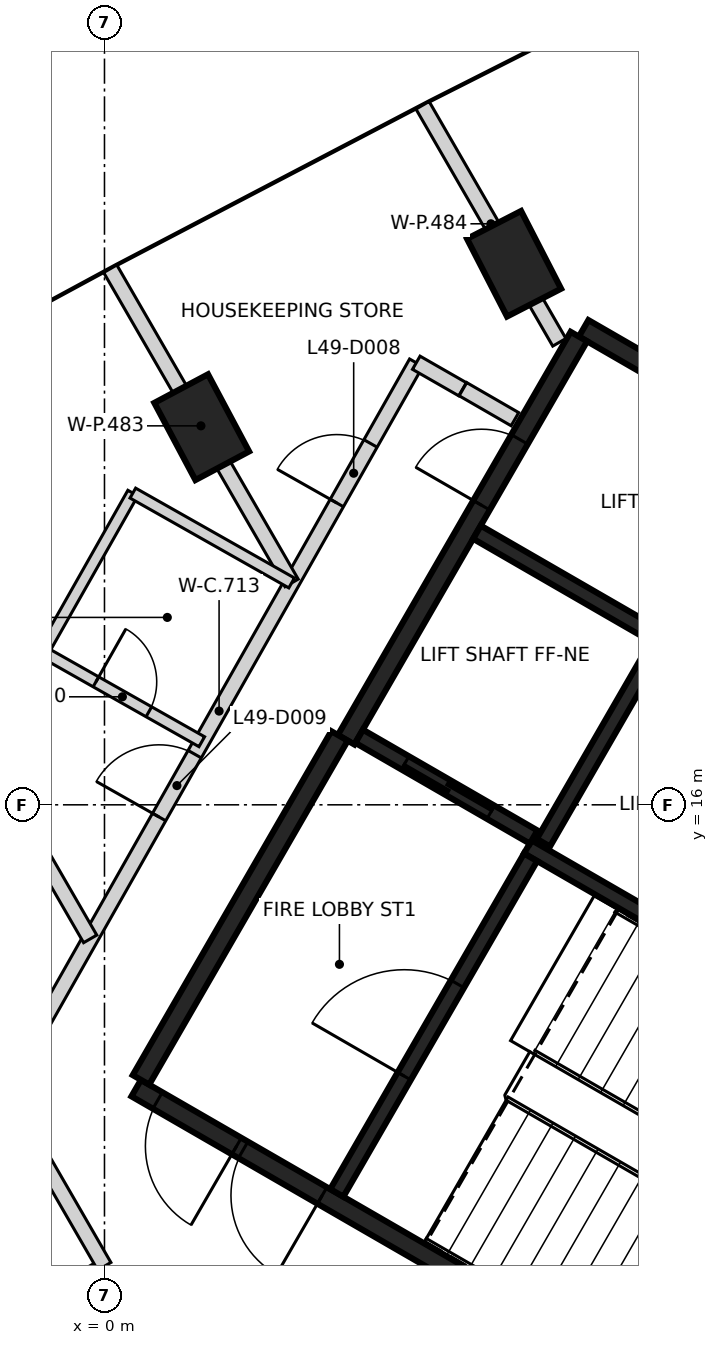
"""IFC4 building model, lengths in metres.
Left out: names, types, materials, properties, quantities, classifications, styles, units other than length and angle.
Written with IfcOpenShell. Run it as: python <this file> out.ifc"""

import sys

from ifc_helpers import new_model, si_unit, direction, frame, frame_2d, origin, origin_2d, place, context, subcontext, project, spatial, rectangle, extrude, element, fill, save


model = new_model("IFC4")
c1 = context("Model", 3, precision=1e-05, world=origin(), true_north=direction((0.0, 1.0)))
c2 = subcontext(c1, "Body", "Model", "MODEL_VIEW")
j1 = project(units=[si_unit("LENGTHUNIT", "METRE"), si_unit("PLANEANGLEUNIT", "RADIAN")], contexts=[c1])
p1 = place(None, origin())
s1 = spatial("IfcSite", under=j1, at=p1, CompositionType="ELEMENT")
p2 = place(p1, origin())
s2 = spatial("IfcBuilding", under=s1, at=p2, CompositionType="ELEMENT")
p3 = place(p2, frame((0.0, 0.0, 197.2)))
s3 = spatial("IfcBuildingStorey", under=s2, at=p3, CompositionType="ELEMENT", Elevation=197.2)
for number, where, z_axis, x_axis in (
    (1, (5.388, 23.118, -0.35), (0.0, 0.0, 1.0), (-0.458, 0.889, 0.0)),
    (2, (1.279, 20.968, -0.35), (0.0, 0.0, 1.0), (-0.47, 0.883, 0.0)),
):
    element("IfcColumn", number, at=place(p3, frame(where, z_axis=z_axis, x_axis=x_axis)), inside=s3, PredefinedType="COLUMN", context=c2, shape_type="SweptSolid", body=[
        extrude(rectangle(XDim=1.15, YDim=0.8, at=origin_2d()), origin(), (0.0, 0.0, 1.0), 3.6),
    ])
p4 = place(p3, frame((10.42, 6.498, 0.0), z_axis=(0.0, 0.0, 1.0), x_axis=(-0.866021906294, 0.500006057782, 0.0)))
e3 = element("IfcWall", 3, at=p4, inside=s3, PredefinedType="SHEAR", context=c2, shape_type="SweptSolid", body=[
    extrude(rectangle(XDim=11.55, YDim=0.25, at=frame_2d((5.775, 0.0))), origin(), (0.0, 0.0, 1.0), 3.25),
])
p5 = place(p4, frame((10.025, 0.0, 0.0)))
e4 = element("IfcOpeningElement", 4, at=p5, cuts=e3, PredefinedType="OPENING", context=c2, shape_type="SweptSolid", body=[
    extrude(rectangle(XDim=1.2, YDim=2.1, at=frame_2d((0.6, 1.05))), frame((0.0, 0.135, 0.0), z_axis=(0.0, -1.0, 0.0), x_axis=(1.0, 0.0, 0.0)), (0.0, 0.0, 1.0), 0.27),
])
p6 = place(p4, frame((8.725, 0.0, 0.0)))
e5 = element("IfcOpeningElement", 5, at=p6, cuts=e3, PredefinedType="OPENING", context=c2, shape_type="SweptSolid", body=[
    extrude(rectangle(XDim=1.2, YDim=2.1, at=frame_2d((0.6, 1.05))), frame((0.0, 0.135, 0.0), z_axis=(0.0, -1.0, 0.0), x_axis=(1.0, 0.0, 0.0)), (0.0, 0.0, 1.0), 0.27),
])
p7 = place(p3, frame((6.304, 22.269, 0.0), z_axis=(0.0, 0.0, 1.0), x_axis=(0.866022959057, -0.500004234368, 0.0)))
e6 = element("IfcWall", 6, at=p7, inside=s3, PredefinedType="SHEAR", context=c2, shape_type="SweptSolid", body=[
    extrude(rectangle(XDim=8.75, YDim=0.25, at=frame_2d((4.375, 0.0))), origin(), (0.0, 0.0, 1.0), 3.25),
])
p8 = place(p3, frame((3.179, 16.856, 0.0), z_axis=(0.0, 0.0, 1.0), x_axis=(0.500001955336, 0.866024274868, 0.0)))
e7 = element("IfcWall", 7, at=p8, inside=s3, PredefinedType="SHEAR", context=c2, shape_type="SweptSolid", body=[
    extrude(rectangle(XDim=6.125, YDim=0.25, at=frame_2d((3.062, 0.0))), origin(), (0.0, 0.0, 1.0), 3.25),
])
p9 = place(p8, frame((3.563, 0.0, 0.0)))
e8 = element("IfcOpeningElement", 8, at=p9, cuts=e7, PredefinedType="OPENING", context=c2, shape_type="SweptSolid", body=[
    extrude(rectangle(XDim=1.0, YDim=2.1, at=frame_2d((0.5, 1.05))), frame((0.0, 0.135, 0.0), z_axis=(0.0, -1.0, 0.0), x_axis=(1.0, 0.0, 0.0)), (0.0, 0.0, 1.0), 0.27),
])
p10 = place(p3, frame((0.48, 12.381, 0.0), z_axis=(0.0, 0.0, 1.0), x_axis=(0.49999885962, 0.866026062182, 0.0)))
e9 = element("IfcWall", 9, at=p10, inside=s3, PredefinedType="SHEAR", context=c2, shape_type="SweptSolid", body=[
    extrude(rectangle(XDim=5.225, YDim=0.25, at=frame_2d((2.612, 0.0))), origin(), (0.0, 0.0, 1.0), 3.25),
])
p11 = place(p3, frame((10.743, 12.46, 0.0), z_axis=(0.0, 0.0, 1.0), x_axis=(-0.866018848283, 0.500011354289, 0.0)))
e10 = element("IfcWall", 10, at=p11, inside=s3, PredefinedType="SHEAR", context=c2, shape_type="SweptSolid", body=[
    extrude(rectangle(XDim=5.974, YDim=0.2, at=frame_2d((2.987, 0.0))), origin(), (0.0, 0.0, 1.0), 3.25),
])
p12 = place(p3, frame((3.057, 10.895, 0.0), z_axis=(0.0, 0.0, 1.0), x_axis=(0.500027839223, 0.866009330205, 0.0)))
e11 = element("IfcWall", 11, at=p12, inside=s3, PredefinedType="SHEAR", context=c2, shape_type="SweptSolid", body=[
    extrude(rectangle(XDim=5.098, YDim=0.2, at=frame_2d((2.549, 0.0))), origin(), (0.0, 0.0, 1.0), 3.25),
])
p13 = place(p12, frame((1.774, 0.0, 0.0)))
e12 = element("IfcOpeningElement", 12, at=p13, cuts=e11, PredefinedType="OPENING", context=c2, shape_type="SweptSolid", body=[
    extrude(rectangle(XDim=1.4, YDim=2.1, at=frame_2d((0.7, 1.05))), frame((0.0, 0.11, 0.0), z_axis=(0.0, -1.0, 0.0), x_axis=(1.0, 0.0, 0.0)), (0.0, 0.0, 1.0), 0.22),
])
p14 = place(p3, frame((7.324, 18.187, 0.0), z_axis=(0.0, 0.0, 1.0), x_axis=(-0.499967891604, -0.866043940782, 0.0)))
e13 = element("IfcWall", 13, at=p14, inside=s3, PredefinedType="SHEAR", context=c2, shape_type="SweptSolid", body=[
    extrude(rectangle(XDim=3.1, YDim=0.2, at=frame_2d((1.55, 0.0))), origin(), (0.0, 0.0, 1.0), 3.25),
])
p15 = place(p3, frame((5.646, 15.576, 0.0), z_axis=(0.0, 0.0, 1.0), x_axis=(-0.866018407898, 0.500012117035, 0.0)))
e14 = element("IfcWall", 14, at=p15, inside=s3, PredefinedType="SHEAR", context=c2, shape_type="SweptSolid", body=[
    extrude(rectangle(XDim=2.651, YDim=0.2, at=frame_2d((1.325, 0.0))), origin(), (0.0, 0.0, 1.0), 3.25),
])
p16 = place(p15, frame((0.652, 0.0, 0.0)))
e15 = element("IfcOpeningElement", 15, at=p16, cuts=e14, PredefinedType="OPENING", context=c2, shape_type="SweptSolid", body=[
    extrude(rectangle(XDim=1.3, YDim=2.1, at=frame_2d((0.65, 1.05))), frame((0.0, 0.11, 0.0), z_axis=(0.0, -1.0, 0.0), x_axis=(1.0, 0.0, 0.0)), (0.0, 0.0, 1.0), 0.22),
])
p17 = place(p3, frame((7.196, 18.26, 0.0), z_axis=(0.0, 0.0, 1.0), x_axis=(-0.866018407898, 0.500012117035, 0.0)))
e16 = element("IfcWall", 16, at=p17, inside=s3, PredefinedType="SHEAR", context=c2, shape_type="SweptSolid", body=[
    extrude(rectangle(XDim=2.651, YDim=0.2, at=frame_2d((1.325, 0.0))), origin(), (0.0, 0.0, 1.0), 3.25),
])
p18 = place(p3, frame((-10.334, 3.963, 0.0), z_axis=(0.0, 0.0, 1.0), x_axis=(0.866013159114, 0.500021207791, 0.0)))
e17 = element("IfcWall", 17, at=p18, inside=s3, PredefinedType="PARTITIONING", context=c2, shape_type="SweptSolid", body=[
    extrude(rectangle(XDim=11.931, YDim=0.2, at=frame_2d((5.966, 0.0))), origin(), (0.0, 0.0, 1.0), 3.25),
])
p19 = place(p18, frame((10.103, 0.0, 0.0)))
e18 = element("IfcOpeningElement", 18, at=p19, cuts=e17, PredefinedType="OPENING", context=c2, shape_type="SweptSolid", body=[
    extrude(rectangle(XDim=1.0, YDim=2.1, at=frame_2d((0.5, 1.05))), frame((0.0, 0.11, 0.0), z_axis=(0.0, -1.0, 0.0), x_axis=(1.0, 0.0, 0.0)), (0.0, 0.0, 1.0), 0.22),
])
p20 = place(p18, frame((8.149, 0.0, 0.0)))
e19 = element("IfcOpeningElement", 19, at=p20, cuts=e17, PredefinedType="OPENING", context=c2, shape_type="SweptSolid", body=[
    extrude(rectangle(XDim=0.95, YDim=2.1, at=frame_2d((0.475, 1.05))), frame((0.0, 0.11, 0.0), z_axis=(0.0, -1.0, 0.0), x_axis=(1.0, 0.0, 0.0)), (0.0, 0.0, 1.0), 0.22),
])
p21 = place(p18, frame((1.831, 0.0, 0.0)))
e20 = element("IfcOpeningElement", 20, at=p21, cuts=e17, PredefinedType="OPENING", context=c2, shape_type="SweptSolid", body=[
    extrude(rectangle(XDim=1.0, YDim=2.1, at=frame_2d((0.5, 1.05))), frame((0.0, 0.11, 0.0), z_axis=(0.0, -1.0, 0.0), x_axis=(1.0, 0.0, 0.0)), (0.0, 0.0, 1.0), 0.22),
])
p22 = place(p3, frame((-1.086, 12.65, 0.0), z_axis=(0.0, 0.0, 1.0), x_axis=(0.492507119433, 0.870308415051, 0.0)))
e21 = element("IfcWall", 21, at=p22, inside=s3, PredefinedType="PARTITIONING", context=c2, shape_type="SweptSolid", body=[
    extrude(rectangle(XDim=10.531, YDim=0.2, at=frame_2d((5.266, 0.0))), origin(), (0.0, 0.0, 1.0), 3.25),
])
p23 = place(p22, frame((8.411, 0.0, 0.0)))
e22 = element("IfcOpeningElement", 22, at=p23, cuts=e21, PredefinedType="OPENING", context=c2, shape_type="SweptSolid", body=[
    extrude(rectangle(XDim=0.9, YDim=2.1, at=frame_2d((0.45, 1.05))), frame((0.0, 0.11, 0.0), z_axis=(0.0, -1.0, 0.0), x_axis=(1.0, 0.0, 0.0)), (0.0, 0.0, 1.0), 0.22),
])
p24 = place(p22, frame((3.664, 0.0, 0.0)))
e23 = element("IfcOpeningElement", 23, at=p24, cuts=e21, PredefinedType="OPENING", context=c2, shape_type="SweptSolid", body=[
    extrude(rectangle(XDim=0.95, YDim=2.1, at=frame_2d((0.475, 1.05))), frame((0.0, 0.11, 0.0), z_axis=(0.0, -1.0, 0.0), x_axis=(1.0, 0.0, 0.0)), (0.0, 0.0, 1.0), 0.22),
])
p25 = place(p3, frame((-0.964, 11.595, 0.0), z_axis=(0.0, 0.0, 1.0), x_axis=(0.500110566207, -0.865961558944, 0.0)))
e24 = element("IfcWall", 24, at=p25, inside=s3, PredefinedType="PARTITIONING", context=c2, shape_type="SweptSolid", body=[
    extrude(rectangle(XDim=1.924, YDim=0.2, at=frame_2d((0.962, 0.0))), origin(), (0.0, 0.0, 1.0), 3.25),
])
p26 = place(p3, frame((4.102, 21.816, 0.0), z_axis=(0.0, 0.0, 1.0), x_axis=(0.867664502326, -0.497150189986, 0.0)))
e25 = element("IfcWall", 25, at=p26, inside=s3, PredefinedType="PARTITIONING", context=c2, shape_type="SweptSolid", body=[
    extrude(rectangle(XDim=0.702, YDim=0.2, at=frame_2d((0.351, 0.0))), origin(), (0.0, 0.0, 1.0), 3.25),
])
p27 = place(p3, frame((4.716, 21.468, 0.0), z_axis=(0.0, 0.0, 1.0), x_axis=(0.865912682783, -0.500195187698, 0.0)))
e26 = element("IfcWall", 26, at=p27, inside=s3, PredefinedType="PARTITIONING", context=c2, shape_type="SweptSolid", body=[
    extrude(rectangle(XDim=0.79, YDim=0.2, at=frame_2d((0.395, 0.0))), origin(), (0.0, 0.0, 1.0), 3.25),
])
p28 = place(p3, frame((-4.004, 20.845, 0.0), z_axis=(0.0, 0.0, 1.0), x_axis=(0.500003076341, -0.866023627651, 0.0)))
e27 = element("IfcWall", 27, at=p28, inside=s3, PredefinedType="PARTITIONING", context=c2, shape_type="SweptSolid", body=[
    extrude(rectangle(XDim=7.631, YDim=0.2, at=frame_2d((3.816, 0.0))), origin(), (0.0, 0.0, 1.0), 3.25),
])
p29 = place(p3, frame((0.076, 23.052, 0.0), z_axis=(0.0, 0.0, 1.0), x_axis=(0.499957131376, -0.866050152581, 0.0)))
e28 = element("IfcWall", 28, at=p29, inside=s3, PredefinedType="PARTITIONING", context=c2, shape_type="SweptSolid", body=[
    extrude(rectangle(XDim=4.773, YDim=0.2, at=frame_2d((2.386, 0.0))), origin(), (0.0, 0.0, 1.0), 3.25),
])
p30 = place(p3, frame((4.184, 25.203, 0.0), z_axis=(0.0, 0.0, 1.0), x_axis=(0.4998731114, -0.866098650558, 0.0)))
e29 = element("IfcWall", 29, at=p30, inside=s3, PredefinedType="PARTITIONING", context=c2, shape_type="SweptSolid", body=[
    extrude(rectangle(XDim=3.601, YDim=0.2, at=frame_2d((1.8, 0.0))), origin(), (0.0, 0.0, 1.0), 3.25),
])
p31 = place(p3, frame((-0.809, 18.012, 0.0), z_axis=(0.0, 0.0, 1.0), x_axis=(0.492476131012, 0.870325950655, 0.0)))
e30 = element("IfcWall", 30, at=p31, inside=s3, PredefinedType="PARTITIONING", context=c2, shape_type="SweptSolid", body=[
    extrude(rectangle(XDim=2.4, YDim=0.15, at=frame_2d((1.2, 0.0))), origin(), (0.0, 0.0, 1.0), 3.25),
])
p32 = place(p3, frame((-0.809, 18.012, 0.0), z_axis=(0.0, 0.0, 1.0), x_axis=(0.870369543509, -0.492399083806, 0.0)))
e31 = element("IfcWall", 31, at=p32, inside=s3, PredefinedType="PARTITIONING", context=c2, shape_type="SweptSolid", body=[
    extrude(rectangle(XDim=2.4, YDim=0.15, at=frame_2d((1.2, 0.0))), origin(), (0.0, 0.0, 1.0), 3.25),
])
p33 = place(p32, frame((0.8, 0.0, 0.0)))
e32 = element("IfcOpeningElement", 32, at=p33, cuts=e31, PredefinedType="OPENING", context=c2, shape_type="SweptSolid", body=[
    extrude(rectangle(XDim=0.8, YDim=2.1, at=frame_2d((0.4, 1.05))), frame((0.0, 0.085, 0.0), z_axis=(0.0, -1.0, 0.0), x_axis=(1.0, 0.0, 0.0)), (0.0, 0.0, 1.0), 0.17),
])
p34 = place(p3, frame((0.373, 20.101, 0.0), z_axis=(0.0, 0.0, 1.0), x_axis=(0.870301279559, -0.492519728334, 0.0)))
e33 = element("IfcWall", 33, at=p34, inside=s3, PredefinedType="PARTITIONING", context=c2, shape_type="SweptSolid", body=[
    extrude(rectangle(XDim=2.4, YDim=0.15, at=frame_2d((1.2, 0.0))), origin(), (0.0, 0.0, 1.0), 3.25),
])
p35 = place(p16, origin())
e34 = element("IfcDoor", 34, at=p35, inside=s3, OperationType="SLIDING_TO_RIGHT", PredefinedType="DOOR", context=c2, shape_type="SweptSolid", body=[
    extrude(rectangle(XDim=1.3, YDim=2.1, at=frame_2d((0.65, 1.05))), frame((0.0, 0.025, 0.0), z_axis=(0.0, -1.0, 0.0), x_axis=(1.0, 0.0, 0.0)), (0.0, 0.0, 1.0), 0.05),
])
fill(e15, e34)
p36 = place(p9, origin())
e35 = element("IfcDoor", 35, at=p36, inside=s3, OperationType="SINGLE_SWING_LEFT", PredefinedType="DOOR", context=c2, shape_type="SweptSolid", body=[
    extrude(rectangle(XDim=1.0, YDim=2.1, at=frame_2d((0.5, 1.05))), frame((0.0, 0.025, 0.0), z_axis=(0.0, -1.0, 0.0), x_axis=(1.0, 0.0, 0.0)), (0.0, 0.0, 1.0), 0.05),
])
fill(e8, e35)
p37 = place(p5, origin())
e36 = element("IfcDoor", 36, at=p37, inside=s3, OperationType="SINGLE_SWING_LEFT", PredefinedType="DOOR", context=c2, shape_type="SweptSolid", body=[
    extrude(rectangle(XDim=1.2, YDim=2.1, at=frame_2d((0.6, 1.05))), frame((0.0, 0.025, 0.0), z_axis=(0.0, -1.0, 0.0), x_axis=(1.0, 0.0, 0.0)), (0.0, 0.0, 1.0), 0.05),
])
fill(e4, e36)
p38 = place(p6, origin())
e37 = element("IfcDoor", 37, at=p38, inside=s3, OperationType="SINGLE_SWING_RIGHT", PredefinedType="DOOR", context=c2, shape_type="SweptSolid", body=[
    extrude(rectangle(XDim=1.2, YDim=2.1, at=frame_2d((0.6, 1.05))), frame((0.0, 0.025, 0.0), z_axis=(0.0, -1.0, 0.0), x_axis=(1.0, 0.0, 0.0)), (0.0, 0.0, 1.0), 0.05),
])
fill(e5, e37)
p39 = place(p13, origin())
e38 = element("IfcDoor", 38, at=p39, inside=s3, OperationType="SINGLE_SWING_RIGHT", PredefinedType="DOOR", context=c2, shape_type="SweptSolid", body=[
    extrude(rectangle(XDim=1.4, YDim=2.1, at=frame_2d((0.7, 1.05))), frame((0.0, 0.025, 0.0), z_axis=(0.0, -1.0, 0.0), x_axis=(1.0, 0.0, 0.0)), (0.0, 0.0, 1.0), 0.05),
])
fill(e12, e38)
p40 = place(p23, origin())
e39 = element("IfcDoor", 39, at=p40, inside=s3, OperationType="SINGLE_SWING_LEFT", PredefinedType="DOOR", context=c2, shape_type="SweptSolid", body=[
    extrude(rectangle(XDim=0.9, YDim=2.1, at=frame_2d((0.45, 1.05))), frame((0.0, 0.025, 0.0), z_axis=(0.0, -1.0, 0.0), x_axis=(1.0, 0.0, 0.0)), (0.0, 0.0, 1.0), 0.05),
])
fill(e22, e39)
p41 = place(p24, origin())
e40 = element("IfcDoor", 40, at=p41, inside=s3, OperationType="SINGLE_SWING_LEFT", PredefinedType="DOOR", context=c2, shape_type="SweptSolid", body=[
    extrude(rectangle(XDim=0.95, YDim=2.1, at=frame_2d((0.475, 1.05))), frame((0.0, 0.025, 0.0), z_axis=(0.0, -1.0, 0.0), x_axis=(1.0, 0.0, 0.0)), (0.0, 0.0, 1.0), 0.05),
])
fill(e23, e40)
p42 = place(p33, origin())
e41 = element("IfcDoor", 41, at=p42, inside=s3, OperationType="SINGLE_SWING_LEFT", PredefinedType="DOOR", context=c2, shape_type="SweptSolid", body=[
    extrude(rectangle(XDim=0.8, YDim=2.1, at=frame_2d((0.4, 1.05))), frame((0.0, 0.025, 0.0), z_axis=(0.0, -1.0, 0.0), x_axis=(1.0, 0.0, 0.0)), (0.0, 0.0, 1.0), 0.05),
])
fill(e32, e41)
save(model, sys.argv[1])
